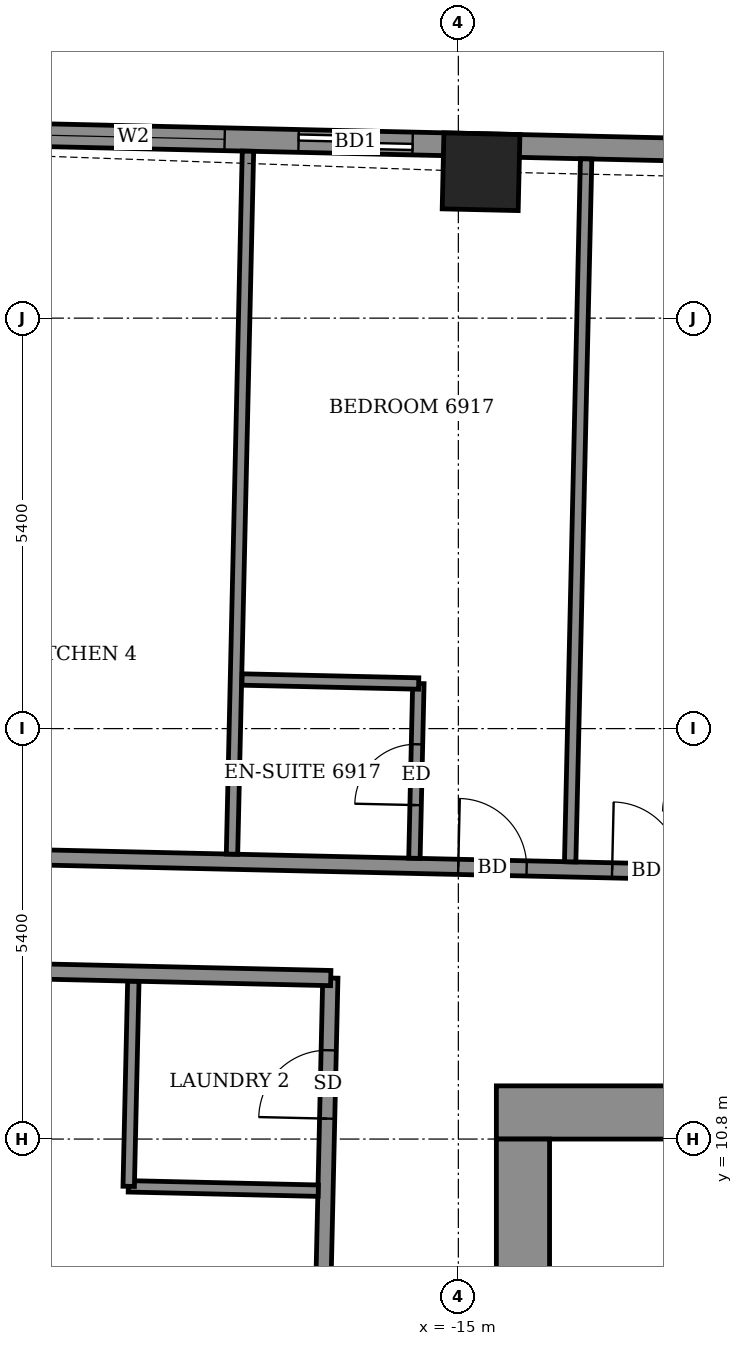
"""IFC4 building model, lengths in metres.
Left out: names, types, materials, properties, quantities, classifications, styles, units other than length and angle.
Written with IfcOpenShell. Run it as: python <this file> out.ifc"""

import sys

from ifc_helpers import new_model, si_unit, direction, frame, frame_2d, origin, origin_2d, place, context, subcontext, project, spatial, rectangle, extrude, element, fill, save


model = new_model("IFC4")
c1 = context("Model", 3, precision=1e-05, world=origin(), true_north=direction((0.0, 1.0)))
c2 = subcontext(c1, "Body", "Model", "MODEL_VIEW")
j1 = project(units=[si_unit("LENGTHUNIT", "METRE"), si_unit("PLANEANGLEUNIT", "RADIAN")], contexts=[c1])
p1 = place(None, origin())
s1 = spatial("IfcSite", under=j1, at=p1, CompositionType="ELEMENT")
p2 = place(p1, origin())
s2 = spatial("IfcBuilding", under=s1, at=p2, CompositionType="ELEMENT")
p3 = place(p2, frame((0.0, 0.0, 271.7)))
s3 = spatial("IfcBuildingStorey", under=s2, at=p3, CompositionType="ELEMENT", Elevation=271.7)
p4 = place(p3, frame((-14.701, 23.526, -0.55), z_axis=(0.0, 0.0, 1.0), x_axis=(-0.999741948423, 0.022716438162, 0.0)))
e1 = element("IfcColumn", 1, at=p4, inside=s3, PredefinedType="COLUMN", context=c2, shape_type="SweptSolid", body=[
    extrude(rectangle(XDim=1.0, YDim=1.0, at=origin_2d()), origin(), (0.0, 0.0, 1.0), 3.6),
])
p5 = place(p3, frame((26.35, 22.945, 0.0), z_axis=(0.0, 0.0, 1.0), x_axis=(-0.999742523712, 0.022691105788, 0.0)))
e2 = element("IfcWall", 2, at=p5, inside=s3, PredefinedType="SOLIDWALL", context=c2, shape_type="SweptSolid", body=[
    extrude(rectangle(XDim=47.771, YDim=0.3, at=frame_2d((23.886, 0.0))), origin(), (0.0, 0.0, 1.0), 2.55),
])
p6 = place(p5, frame((1.954, 0.0, 0.0)))
e3 = element("IfcOpeningElement", 3, at=p6, cuts=e2, PredefinedType="OPENING", context=c2, shape_type="SweptSolid", body=[
    extrude(rectangle(XDim=1.5, YDim=2.4, at=frame_2d((0.75, 1.2))), frame((0.0, 0.16, 0.0), z_axis=(0.0, -1.0, 0.0), x_axis=(1.0, 0.0, 0.0)), (0.0, 0.0, 1.0), 0.32),
])
p7 = place(p5, frame((7.37, 0.0, 0.0)))
e4 = element("IfcOpeningElement", 4, at=p7, cuts=e2, PredefinedType="OPENING", context=c2, shape_type="SweptSolid", body=[
    extrude(rectangle(XDim=1.5, YDim=2.4, at=frame_2d((0.75, 1.2))), frame((0.0, 0.16, 0.0), z_axis=(0.0, -1.0, 0.0), x_axis=(1.0, 0.0, 0.0)), (0.0, 0.0, 1.0), 0.32),
])
p8 = place(p5, frame((10.554, 0.0, 0.0)))
e5 = element("IfcOpeningElement", 5, at=p8, cuts=e2, PredefinedType="OPENING", context=c2, shape_type="SweptSolid", body=[
    extrude(rectangle(XDim=1.5, YDim=2.4, at=frame_2d((0.75, 1.2))), frame((0.0, 0.16, 0.0), z_axis=(0.0, -1.0, 0.0), x_axis=(1.0, 0.0, 0.0)), (0.0, 0.0, 1.0), 0.32),
])
p9 = place(p5, frame((15.104, 0.0, 0.0)))
e6 = element("IfcOpeningElement", 6, at=p9, cuts=e2, PredefinedType="OPENING", context=c2, shape_type="SweptSolid", body=[
    extrude(rectangle(XDim=1.5, YDim=2.4, at=frame_2d((0.75, 1.2))), frame((0.0, 0.16, 0.0), z_axis=(0.0, -1.0, 0.0), x_axis=(1.0, 0.0, 0.0)), (0.0, 0.0, 1.0), 0.32),
])
p10 = place(p5, frame((18.287, 0.0, 0.0)))
e7 = element("IfcOpeningElement", 7, at=p10, cuts=e2, PredefinedType="OPENING", context=c2, shape_type="SweptSolid", body=[
    extrude(rectangle(XDim=1.5, YDim=2.4, at=frame_2d((0.75, 1.2))), frame((0.0, 0.16, 0.0), z_axis=(0.0, -1.0, 0.0), x_axis=(1.0, 0.0, 0.0)), (0.0, 0.0, 1.0), 0.32),
])
p11 = place(p5, frame((23.622, 0.0, 0.0)))
e8 = element("IfcOpeningElement", 8, at=p11, cuts=e2, PredefinedType="OPENING", context=c2, shape_type="SweptSolid", body=[
    extrude(rectangle(XDim=1.5, YDim=2.4, at=frame_2d((0.75, 1.2))), frame((0.0, 0.16, 0.0), z_axis=(0.0, -1.0, 0.0), x_axis=(1.0, 0.0, 0.0)), (0.0, 0.0, 1.0), 0.32),
])
p12 = place(p5, frame((28.521, 0.0, 0.0)))
e9 = element("IfcOpeningElement", 9, at=p12, cuts=e2, PredefinedType="OPENING", context=c2, shape_type="SweptSolid", body=[
    extrude(rectangle(XDim=1.5, YDim=2.4, at=frame_2d((0.75, 1.2))), frame((0.0, 0.16, 0.0), z_axis=(0.0, -1.0, 0.0), x_axis=(1.0, 0.0, 0.0)), (0.0, 0.0, 1.0), 0.32),
])
p13 = place(p5, frame((31.705, 0.0, 0.0)))
e10 = element("IfcOpeningElement", 10, at=p13, cuts=e2, PredefinedType="OPENING", context=c2, shape_type="SweptSolid", body=[
    extrude(rectangle(XDim=1.5, YDim=2.4, at=frame_2d((0.75, 1.2))), frame((0.0, 0.16, 0.0), z_axis=(0.0, -1.0, 0.0), x_axis=(1.0, 0.0, 0.0)), (0.0, 0.0, 1.0), 0.32),
])
p14 = place(p5, frame((36.722, 0.0, 0.0)))
e11 = element("IfcOpeningElement", 11, at=p14, cuts=e2, PredefinedType="OPENING", context=c2, shape_type="SweptSolid", body=[
    extrude(rectangle(XDim=1.5, YDim=2.4, at=frame_2d((0.75, 1.2))), frame((0.0, 0.16, 0.0), z_axis=(0.0, -1.0, 0.0), x_axis=(1.0, 0.0, 0.0)), (0.0, 0.0, 1.0), 0.32),
])
p15 = place(p5, frame((41.963, 0.0, 0.0)))
e12 = element("IfcOpeningElement", 12, at=p15, cuts=e2, PredefinedType="OPENING", context=c2, shape_type="SweptSolid", body=[
    extrude(rectangle(XDim=1.5, YDim=2.4, at=frame_2d((0.75, 1.2))), frame((0.0, 0.16, 0.0), z_axis=(0.0, -1.0, 0.0), x_axis=(1.0, 0.0, 0.0)), (0.0, 0.0, 1.0), 0.32),
])
p16 = place(p5, frame((44.436, 0.0, 0.9)))
e13 = element("IfcOpeningElement", 13, at=p16, cuts=e2, PredefinedType="OPENING", context=c2, shape_type="SweptSolid", body=[
    extrude(rectangle(XDim=2.4, YDim=1.5, at=frame_2d((1.2, 0.75))), frame((0.0, 0.16, 0.0), z_axis=(0.0, -1.0, 0.0), x_axis=(1.0, 0.0, 0.0)), (0.0, 0.0, 1.0), 0.32),
])
p17 = place(p3, frame((-17.262, -12.525, 0.0), z_axis=(0.0, 0.0, 1.0), x_axis=(0.022706151961, 0.999742182097, 0.0)))
e14 = element("IfcWall", 14, at=p17, inside=s3, PredefinedType="PARTITIONING", context=c2, shape_type="SweptSolid", body=[
    extrude(rectangle(XDim=25.45, YDim=0.2, at=frame_2d((12.725, 0.0))), origin(), (0.0, 0.0, 1.0), 3.05),
])
p18 = place(p17, frame((19.913, 0.0, 0.0)))
e15 = element("IfcOpeningElement", 15, at=p18, cuts=e14, PredefinedType="OPENING", context=c2, shape_type="SweptSolid", body=[
    extrude(rectangle(XDim=1.0, YDim=2.1, at=frame_2d((0.5, 1.05))), frame((0.0, 0.11, 0.0), z_axis=(0.0, -1.0, 0.0), x_axis=(1.0, 0.0, 0.0)), (0.0, 0.0, 1.0), 0.22),
])
p19 = place(p17, frame((23.6, 0.0, 0.0)))
e16 = element("IfcOpeningElement", 16, at=p19, cuts=e14, PredefinedType="OPENING", context=c2, shape_type="SweptSolid", body=[
    extrude(rectangle(XDim=0.9, YDim=2.1, at=frame_2d((0.45, 1.05))), frame((0.0, 0.11, 0.0), z_axis=(0.0, -1.0, 0.0), x_axis=(1.0, 0.0, 0.0)), (0.0, 0.0, 1.0), 0.22),
])
p20 = place(p17, frame((14.325, 0.0, 0.0)))
e17 = element("IfcOpeningElement", 17, at=p20, cuts=e14, PredefinedType="OPENING", context=c2, shape_type="SweptSolid", body=[
    extrude(rectangle(XDim=1.0, YDim=2.1, at=frame_2d((0.5, 1.05))), frame((0.0, 0.11, 0.0), z_axis=(0.0, -1.0, 0.0), x_axis=(1.0, 0.0, 0.0)), (0.0, 0.0, 1.0), 0.22),
])
p21 = place(p17, frame((16.525, 0.0, 0.0)))
e18 = element("IfcOpeningElement", 18, at=p21, cuts=e14, PredefinedType="OPENING", context=c2, shape_type="SweptSolid", body=[
    extrude(rectangle(XDim=0.9, YDim=2.1, at=frame_2d((0.45, 1.05))), frame((0.0, 0.11, 0.0), z_axis=(0.0, -1.0, 0.0), x_axis=(1.0, 0.0, 0.0)), (0.0, 0.0, 1.0), 0.22),
])
p22 = place(p17, frame((9.85, 0.0, 0.0)))
e19 = element("IfcOpeningElement", 19, at=p22, cuts=e14, PredefinedType="OPENING", context=c2, shape_type="SweptSolid", body=[
    extrude(rectangle(XDim=1.0, YDim=2.1, at=frame_2d((0.5, 1.05))), frame((0.0, 0.11, 0.0), z_axis=(0.0, -1.0, 0.0), x_axis=(1.0, 0.0, 0.0)), (0.0, 0.0, 1.0), 0.22),
])
p23 = place(p17, frame((12.125, 0.0, 0.0)))
e20 = element("IfcOpeningElement", 20, at=p23, cuts=e14, PredefinedType="OPENING", context=c2, shape_type="SweptSolid", body=[
    extrude(rectangle(XDim=0.9, YDim=2.1, at=frame_2d((0.45, 1.05))), frame((0.0, 0.11, 0.0), z_axis=(0.0, -1.0, 0.0), x_axis=(1.0, 0.0, 0.0)), (0.0, 0.0, 1.0), 0.22),
])
p24 = place(p17, frame((7.725, 0.0, 0.0)))
e21 = element("IfcOpeningElement", 21, at=p24, cuts=e14, PredefinedType="OPENING", context=c2, shape_type="SweptSolid", body=[
    extrude(rectangle(XDim=1.0, YDim=2.1, at=frame_2d((0.5, 1.05))), frame((0.0, 0.11, 0.0), z_axis=(0.0, -1.0, 0.0), x_axis=(1.0, 0.0, 0.0)), (0.0, 0.0, 1.0), 0.22),
])
p25 = place(p17, frame((5.275, 0.0, 0.0)))
e22 = element("IfcOpeningElement", 22, at=p25, cuts=e14, PredefinedType="OPENING", context=c2, shape_type="SweptSolid", body=[
    extrude(rectangle(XDim=0.9, YDim=2.1, at=frame_2d((0.45, 1.05))), frame((0.0, 0.11, 0.0), z_axis=(0.0, -1.0, 0.0), x_axis=(1.0, 0.0, 0.0)), (0.0, 0.0, 1.0), 0.22),
])
p26 = place(p17, frame((0.512, 0.0, 0.0)))
e23 = element("IfcOpeningElement", 23, at=p26, cuts=e14, PredefinedType="OPENING", context=c2, shape_type="SweptSolid", body=[
    extrude(rectangle(XDim=1.0, YDim=2.1, at=frame_2d((0.5, 1.05))), frame((0.0, 0.11, 0.0), z_axis=(0.0, -1.0, 0.0), x_axis=(1.0, 0.0, 0.0)), (0.0, 0.0, 1.0), 0.22),
])
p27 = place(p17, frame((2.775, 0.0, 0.0)))
e24 = element("IfcOpeningElement", 24, at=p27, cuts=e14, PredefinedType="OPENING", context=c2, shape_type="SweptSolid", body=[
    extrude(rectangle(XDim=0.9, YDim=2.1, at=frame_2d((0.45, 1.05))), frame((0.0, 0.11, 0.0), z_axis=(0.0, -1.0, 0.0), x_axis=(1.0, 0.0, 0.0)), (0.0, 0.0, 1.0), 0.22),
])
p28 = place(p3, frame((-19.342, 10.178, 0.0), z_axis=(0.0, 0.0, 1.0), x_axis=(0.999741028149, -0.022756903044, 0.0)))
e25 = element("IfcWall", 25, at=p28, inside=s3, PredefinedType="PARTITIONING", context=c2, shape_type="SweptSolid", body=[
    extrude(rectangle(XDim=2.5, YDim=0.15, at=frame_2d((1.25, 0.0))), origin(), (0.0, 0.0, 1.0), 3.05),
])
p29 = place(p3, frame((-19.337, 10.178, 0.0), z_axis=(0.0, 0.0, 1.0), x_axis=(0.02260842146, 0.999744396973, 0.0)))
e26 = element("IfcWall", 26, at=p29, inside=s3, PredefinedType="PARTITIONING", context=c2, shape_type="SweptSolid", body=[
    extrude(rectangle(XDim=2.7, YDim=0.15, at=frame_2d((1.35, 0.0))), origin(), (0.0, 0.0, 1.0), 3.05),
])
p30 = place(p3, frame((-24.508, 13.096, 0.0), z_axis=(0.0, 0.0, 1.0), x_axis=(0.99974170677, -0.022727070732, 0.0)))
e27 = element("IfcWall", 27, at=p30, inside=s3, PredefinedType="PARTITIONING", context=c2, shape_type="SweptSolid", body=[
    extrude(rectangle(XDim=7.831, YDim=0.2, at=frame_2d((3.916, 0.0))), origin(), (0.0, 0.0, 1.0), 3.05),
])
p31 = place(p3, frame((-24.474, 14.596, 0.0), z_axis=(0.0, 0.0, 1.0), x_axis=(0.999742424031, -0.022695497208, 0.0)))
e28 = element("IfcWall", 28, at=p31, inside=s3, PredefinedType="PARTITIONING", context=c2, shape_type="SweptSolid", body=[
    extrude(rectangle(XDim=52.872, YDim=0.2, at=frame_2d((26.436, 0.0))), origin(), (0.0, 0.0, 1.0), 3.05),
])
p32 = place(p31, frame((51.161, 0.0, 0.0)))
e29 = element("IfcOpeningElement", 29, at=p32, cuts=e28, PredefinedType="OPENING", context=c2, shape_type="SweptSolid", body=[
    extrude(rectangle(XDim=1.0, YDim=2.1, at=frame_2d((0.5, 1.05))), frame((0.0, 0.11, 0.0), z_axis=(0.0, -1.0, 0.0), x_axis=(1.0, 0.0, 0.0)), (0.0, 0.0, 1.0), 0.22),
])
p33 = place(p31, frame((46.7, 0.0, 0.0)))
e30 = element("IfcOpeningElement", 30, at=p33, cuts=e28, PredefinedType="OPENING", context=c2, shape_type="SweptSolid", body=[
    extrude(rectangle(XDim=0.9, YDim=2.1, at=frame_2d((0.45, 1.05))), frame((0.0, 0.11, 0.0), z_axis=(0.0, -1.0, 0.0), x_axis=(1.0, 0.0, 0.0)), (0.0, 0.0, 1.0), 0.22),
])
p34 = place(p31, frame((44.3, 0.0, 0.0)))
e31 = element("IfcOpeningElement", 31, at=p34, cuts=e28, PredefinedType="OPENING", context=c2, shape_type="SweptSolid", body=[
    extrude(rectangle(XDim=0.9, YDim=2.1, at=frame_2d((0.45, 1.05))), frame((0.0, 0.11, 0.0), z_axis=(0.0, -1.0, 0.0), x_axis=(1.0, 0.0, 0.0)), (0.0, 0.0, 1.0), 0.22),
])
p35 = place(p31, frame((37.575, 0.0, 0.0)))
e32 = element("IfcOpeningElement", 32, at=p35, cuts=e28, PredefinedType="OPENING", context=c2, shape_type="SweptSolid", body=[
    extrude(rectangle(XDim=0.9, YDim=2.1, at=frame_2d((0.45, 1.05))), frame((0.0, 0.11, 0.0), z_axis=(0.0, -1.0, 0.0), x_axis=(1.0, 0.0, 0.0)), (0.0, 0.0, 1.0), 0.22),
])
p36 = place(p31, frame((35.675, 0.0, 0.0)))
e33 = element("IfcOpeningElement", 33, at=p36, cuts=e28, PredefinedType="OPENING", context=c2, shape_type="SweptSolid", body=[
    extrude(rectangle(XDim=0.9, YDim=2.1, at=frame_2d((0.45, 1.05))), frame((0.0, 0.11, 0.0), z_axis=(0.0, -1.0, 0.0), x_axis=(1.0, 0.0, 0.0)), (0.0, 0.0, 1.0), 0.22),
])
p37 = place(p31, frame((28.95, 0.0, 0.0)))
e34 = element("IfcOpeningElement", 34, at=p37, cuts=e28, PredefinedType="OPENING", context=c2, shape_type="SweptSolid", body=[
    extrude(rectangle(XDim=0.9, YDim=2.1, at=frame_2d((0.45, 1.05))), frame((0.0, 0.11, 0.0), z_axis=(0.0, -1.0, 0.0), x_axis=(1.0, 0.0, 0.0)), (0.0, 0.0, 1.0), 0.22),
])
p38 = place(p31, frame((27.0, 0.0, 0.0)))
e35 = element("IfcOpeningElement", 35, at=p38, cuts=e28, PredefinedType="OPENING", context=c2, shape_type="SweptSolid", body=[
    extrude(rectangle(XDim=0.9, YDim=2.1, at=frame_2d((0.45, 1.05))), frame((0.0, 0.11, 0.0), z_axis=(0.0, -1.0, 0.0), x_axis=(1.0, 0.0, 0.0)), (0.0, 0.0, 1.0), 0.22),
])
p39 = place(p31, frame((20.2, 0.0, 0.0)))
e36 = element("IfcOpeningElement", 36, at=p39, cuts=e28, PredefinedType="OPENING", context=c2, shape_type="SweptSolid", body=[
    extrude(rectangle(XDim=0.9, YDim=2.1, at=frame_2d((0.45, 1.05))), frame((0.0, 0.11, 0.0), z_axis=(0.0, -1.0, 0.0), x_axis=(1.0, 0.0, 0.0)), (0.0, 0.0, 1.0), 0.22),
])
p40 = place(p31, frame((18.25, 0.0, 0.0)))
e37 = element("IfcOpeningElement", 37, at=p40, cuts=e28, PredefinedType="OPENING", context=c2, shape_type="SweptSolid", body=[
    extrude(rectangle(XDim=0.9, YDim=2.1, at=frame_2d((0.45, 1.05))), frame((0.0, 0.11, 0.0), z_axis=(0.0, -1.0, 0.0), x_axis=(1.0, 0.0, 0.0)), (0.0, 0.0, 1.0), 0.22),
])
p41 = place(p31, frame((11.5, 0.0, 0.0)))
e38 = element("IfcOpeningElement", 38, at=p41, cuts=e28, PredefinedType="OPENING", context=c2, shape_type="SweptSolid", body=[
    extrude(rectangle(XDim=0.9, YDim=2.1, at=frame_2d((0.45, 1.05))), frame((0.0, 0.11, 0.0), z_axis=(0.0, -1.0, 0.0), x_axis=(1.0, 0.0, 0.0)), (0.0, 0.0, 1.0), 0.22),
])
p42 = place(p31, frame((9.475, 0.0, 0.0)))
e39 = element("IfcOpeningElement", 39, at=p42, cuts=e28, PredefinedType="OPENING", context=c2, shape_type="SweptSolid", body=[
    extrude(rectangle(XDim=0.9, YDim=2.1, at=frame_2d((0.45, 1.05))), frame((0.0, 0.11, 0.0), z_axis=(0.0, -1.0, 0.0), x_axis=(1.0, 0.0, 0.0)), (0.0, 0.0, 1.0), 0.22),
])
p43 = place(p31, frame((2.293, 0.0, 0.0)))
e40 = element("IfcOpeningElement", 40, at=p43, cuts=e28, PredefinedType="OPENING", context=c2, shape_type="SweptSolid", body=[
    extrude(rectangle(XDim=1.0, YDim=2.1, at=frame_2d((0.5, 1.05))), frame((0.0, 0.11, 0.0), z_axis=(0.0, -1.0, 0.0), x_axis=(1.0, 0.0, 0.0)), (0.0, 0.0, 1.0), 0.22),
])
p44 = place(p3, frame((-17.978, 14.548, 0.0), z_axis=(0.0, 0.0, 1.0), x_axis=(0.022698023584, 0.999742366675, 0.0)))
e41 = element("IfcWall", 41, at=p44, inside=s3, PredefinedType="PARTITIONING", context=c2, shape_type="SweptSolid", body=[
    extrude(rectangle(XDim=9.25, YDim=0.15, at=frame_2d((4.625, 0.0))), origin(), (0.0, 0.0, 1.0), 2.55),
])
p45 = place(p3, frame((-15.578, 14.494, 0.0), z_axis=(0.0, 0.0, 1.0), x_axis=(0.022612884682, 0.999744296031, 0.0)))
e42 = element("IfcWall", 42, at=p45, inside=s3, PredefinedType="PARTITIONING", context=c2, shape_type="SweptSolid", body=[
    extrude(rectangle(XDim=2.3, YDim=0.15, at=frame_2d((1.15, 0.0))), origin(), (0.0, 0.0, 1.0), 3.05),
])
p46 = place(p45, frame((0.7, 0.0, 0.0)))
e43 = element("IfcOpeningElement", 43, at=p46, cuts=e42, PredefinedType="OPENING", context=c2, shape_type="SweptSolid", body=[
    extrude(rectangle(XDim=0.8, YDim=2.1, at=frame_2d((0.4, 1.05))), frame((0.0, 0.085, 0.0), z_axis=(0.0, -1.0, 0.0), x_axis=(1.0, 0.0, 0.0)), (0.0, 0.0, 1.0), 0.17),
])
p47 = place(p3, frame((-13.529, 14.447, 0.0), z_axis=(0.0, 0.0, 1.0), x_axis=(0.022697424684, 0.999742380272, 0.0)))
e44 = element("IfcWall", 44, at=p47, inside=s3, PredefinedType="PARTITIONING", context=c2, shape_type="SweptSolid", body=[
    extrude(rectangle(XDim=9.25, YDim=0.15, at=frame_2d((4.625, 0.0))), origin(), (0.0, 0.0, 1.0), 2.55),
])
p48 = place(p3, frame((-17.846, 16.846, 0.0), z_axis=(0.0, 0.0, 1.0), x_axis=(0.999740260747, -0.02279059109, 0.0)))
e45 = element("IfcWall", 45, at=p48, inside=s3, PredefinedType="PARTITIONING", context=c2, shape_type="SweptSolid", body=[
    extrude(rectangle(XDim=2.324, YDim=0.15, at=frame_2d((1.162, 0.0))), origin(), (0.0, 0.0, 1.0), 3.05),
])
p49 = place(p3, frame((-14.5, 11.15, 0.0), z_axis=(0.0, 0.0, 1.0), x_axis=(1.0, 0.0, 0.0)))
e46 = element("IfcWall", 46, at=p49, inside=s3, PredefinedType="SHEAR", context=c2, shape_type="SweptSolid", body=[
    extrude(rectangle(XDim=29.0, YDim=0.7, at=frame_2d((14.5, 0.0))), origin(), (0.0, 0.0, 1.0), 3.6),
])
p50 = place(p3, frame((-14.15, -10.8, 0.0), z_axis=(0.0, 0.0, 1.0), x_axis=(0.0, 1.0, 0.0)))
e47 = element("IfcWall", 47, at=p50, inside=s3, PredefinedType="SHEAR", context=c2, shape_type="SweptSolid", body=[
    extrude(rectangle(XDim=21.6, YDim=0.7, at=frame_2d((10.8, 0.0))), origin(), (0.0, 0.0, 1.0), 3.6),
])
p51 = place(p50, frame((8.25, 0.0, 0.0)))
e48 = element("IfcOpeningElement", 48, at=p51, cuts=e47, PredefinedType="OPENING", context=c2, shape_type="SweptSolid", body=[
    extrude(rectangle(XDim=1.2, YDim=2.1, at=frame_2d((0.6, 1.05))), frame((0.0, 0.36, 0.0), z_axis=(0.0, -1.0, 0.0), x_axis=(1.0, 0.0, 0.0)), (0.0, 0.0, 1.0), 0.72),
])
p52 = place(p50, frame((15.25, 0.0, 0.0)))
e49 = element("IfcOpeningElement", 49, at=p52, cuts=e47, PredefinedType="OPENING", context=c2, shape_type="SweptSolid", body=[
    extrude(rectangle(XDim=1.2, YDim=2.1, at=frame_2d((0.6, 1.05))), frame((0.0, 0.36, 0.0), z_axis=(0.0, -1.0, 0.0), x_axis=(1.0, 0.0, 0.0)), (0.0, 0.0, 1.0), 0.72),
])
p53 = place(p15, origin())
e50 = element("IfcDoor", 50, at=p53, inside=s3, OperationType="SLIDING_TO_LEFT", PredefinedType="DOOR", context=c2, shape_type="SweptSolid", body=[
    extrude(rectangle(XDim=1.5, YDim=2.4, at=frame_2d((0.75, 1.2))), frame((0.0, 0.025, 0.0), z_axis=(0.0, -1.0, 0.0), x_axis=(1.0, 0.0, 0.0)), (0.0, 0.0, 1.0), 0.05),
])
fill(e12, e50)
p54 = place(p16, origin())
e51 = element("IfcWindow", 51, at=p54, inside=s3, PartitioningType="DOUBLE_PANEL_VERTICAL", PredefinedType="WINDOW", context=c2, shape_type="SweptSolid", body=[
    extrude(rectangle(XDim=2.4, YDim=1.5, at=frame_2d((1.2, 0.75))), frame((0.0, 0.03, 0.0), z_axis=(0.0, -1.0, 0.0), x_axis=(1.0, 0.0, 0.0)), (0.0, 0.0, 1.0), 0.06),
])
fill(e13, e51)
p55 = place(p41, origin())
e52 = element("IfcDoor", 52, at=p55, inside=s3, OperationType="SINGLE_SWING_RIGHT", PredefinedType="DOOR", context=c2, shape_type="SweptSolid", body=[
    extrude(rectangle(XDim=0.9, YDim=2.1, at=frame_2d((0.45, 1.05))), frame((0.0, 0.025, 0.0), z_axis=(0.0, -1.0, 0.0), x_axis=(1.0, 0.0, 0.0)), (0.0, 0.0, 1.0), 0.05),
])
fill(e38, e52)
p56 = place(p42, origin())
e53 = element("IfcDoor", 53, at=p56, inside=s3, OperationType="SINGLE_SWING_LEFT", PredefinedType="DOOR", context=c2, shape_type="SweptSolid", body=[
    extrude(rectangle(XDim=0.9, YDim=2.1, at=frame_2d((0.45, 1.05))), frame((0.0, 0.025, 0.0), z_axis=(0.0, -1.0, 0.0), x_axis=(1.0, 0.0, 0.0)), (0.0, 0.0, 1.0), 0.05),
])
fill(e39, e53)
p57 = place(p46, origin())
e54 = element("IfcDoor", 54, at=p57, inside=s3, OperationType="SINGLE_SWING_LEFT", PredefinedType="DOOR", context=c2, shape_type="SweptSolid", body=[
    extrude(rectangle(XDim=0.8, YDim=2.1, at=frame_2d((0.4, 1.05))), frame((0.0, 0.025, 0.0), z_axis=(0.0, -1.0, 0.0), x_axis=(1.0, 0.0, 0.0)), (0.0, 0.0, 1.0), 0.05),
])
fill(e43, e54)
p58 = place(p19, origin())
e55 = element("IfcDoor", 55, at=p58, inside=s3, OperationType="SINGLE_SWING_LEFT", PredefinedType="DOOR", context=c2, shape_type="SweptSolid", body=[
    extrude(rectangle(XDim=0.9, YDim=2.1, at=frame_2d((0.45, 1.05))), frame((0.0, 0.025, 0.0), z_axis=(0.0, -1.0, 0.0), x_axis=(1.0, 0.0, 0.0)), (0.0, 0.0, 1.0), 0.05),
])
fill(e16, e55)
save(model, sys.argv[1])
